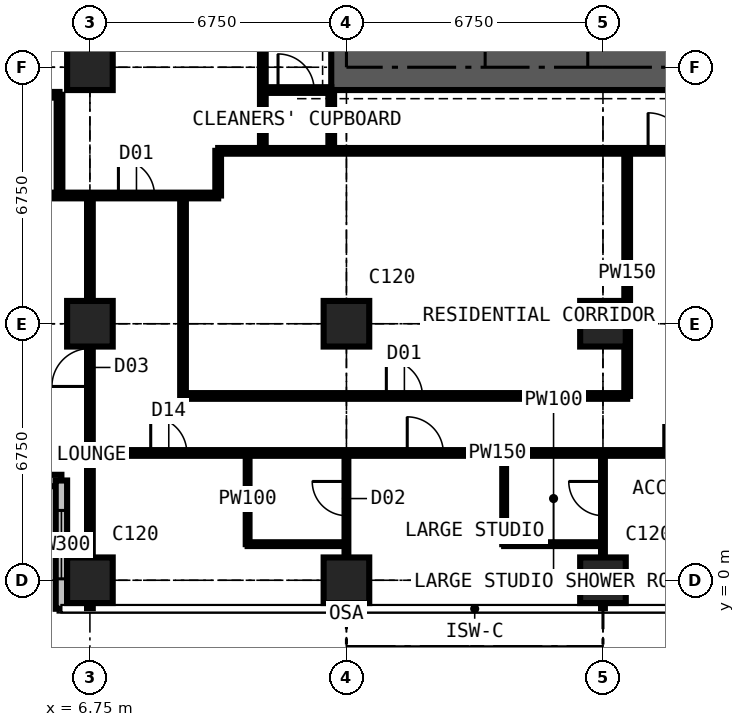
"""IFC4 building model, lengths in metres.
Left out: names, types, materials, properties, quantities, classifications, styles, units other than length and angle.
Written with IfcOpenShell. Run it as: python <this file> out.ifc"""

import sys

from ifc_helpers import new_model, si_unit, direction, frame, frame_2d, origin, origin_2d, place, context, subcontext, project, spatial, rectangle, extrude, element, fill, save


model = new_model("IFC4")
c1 = context("Model", 3, precision=1e-05, world=origin(), true_north=direction((0.0, 1.0)))
c2 = subcontext(c1, "Body", "Model", "MODEL_VIEW")
j1 = project(units=[si_unit("LENGTHUNIT", "METRE"), si_unit("PLANEANGLEUNIT", "RADIAN")], contexts=[c1])
p1 = place(None, origin())
s1 = spatial("IfcSite", under=j1, at=p1, CompositionType="ELEMENT")
p2 = place(p1, origin())
s2 = spatial("IfcBuilding", under=s1, at=p2, CompositionType="ELEMENT")
p3 = place(p2, frame((0.0, 0.0, 181.8)))
s3 = spatial("IfcBuildingStorey", under=s2, at=p3, CompositionType="ELEMENT", Elevation=181.8)
for number, where, z_axis, x_axis in (
    (1, (6.75, 0.0, 0.0), (0.0, 0.0, 1.0), (1.0, 0.0, 0.0)),
    (2, (6.75, 6.75, 0.0), (0.0, 0.0, 1.0), (1.0, 0.0, 0.0)),
    (3, (6.75, 13.5, 0.0), (0.0, 0.0, 1.0), (1.0, 0.0, 0.0)),
    (4, (13.5, 0.0, 0.0), (0.0, 0.0, 1.0), (1.0, 0.0, 0.0)),
    (5, (13.5, 6.75, 0.0), (0.0, 0.0, 1.0), (1.0, 0.0, 0.0)),
    (6, (20.25, 0.0, 0.0), (0.0, 0.0, 1.0), (1.0, 0.0, 0.0)),
    (7, (20.25, 6.75, 0.0), (0.0, 0.0, 1.0), (1.0, 0.0, 0.0)),
):
    element("IfcColumn", number, at=place(p3, frame(where, z_axis=z_axis, x_axis=x_axis)), inside=s3, PredefinedType="COLUMN", context=c2, shape_type="SweptSolid", body=[
        extrude(rectangle(XDim=1.2, YDim=1.2, at=origin_2d()), origin(), (0.0, 0.0, 1.0), 3.6),
    ])
p4 = place(p3, frame((13.1, 13.5, 0.0), z_axis=(0.0, 0.0, 1.0), x_axis=(1.0, 0.0, 0.0)))
e8 = element("IfcWall", 8, at=p4, inside=s3, PredefinedType="SHEAR", context=c2, shape_type="SweptSolid", body=[
    extrude(rectangle(XDim=14.3, YDim=1.2, at=frame_2d((7.15, 0.0))), origin(), (0.0, 0.0, 1.0), 3.6),
])
p5 = place(p3, frame((2.625, 2.625, 0.0), z_axis=(0.0, 0.0, 1.0), x_axis=(1.0, 0.0, 0.0)))
e9 = element("IfcWall", 9, at=p5, inside=s3, PredefinedType="SOLIDWALL", context=c2, shape_type="SweptSolid", body=[
    extrude(rectangle(XDim=3.375, YDim=0.3, at=frame_2d((1.688, 0.0))), origin(), (0.0, 0.0, 1.0), 3.375),
])
p6 = place(p5, frame((0.788, 0.0, 0.6)))
e10 = element("IfcOpeningElement", 10, at=p6, cuts=e9, PredefinedType="OPENING", context=c2, shape_type="SweptSolid", body=[
    extrude(rectangle(XDim=1.8, YDim=2.1, at=frame_2d((0.9, 1.05))), frame((0.0, 0.16, 0.0), z_axis=(0.0, -1.0, 0.0), x_axis=(1.0, 0.0, 0.0)), (0.0, 0.0, 1.0), 0.32),
])
p7 = place(p3, frame((6.0, 2.625, 0.0), z_axis=(0.0, 0.0, 1.0), x_axis=(0.0, -1.0, 0.0)))
e11 = element("IfcWall", 11, at=p7, inside=s3, PredefinedType="SOLIDWALL", context=c2, shape_type="SweptSolid", body=[
    extrude(rectangle(XDim=3.375, YDim=0.3, at=frame_2d((1.688, 0.0))), origin(), (0.0, 0.0, 1.0), 3.375),
])
p8 = place(p7, frame((0.788, 0.0, 0.6)))
e12 = element("IfcOpeningElement", 12, at=p8, cuts=e11, PredefinedType="OPENING", context=c2, shape_type="SweptSolid", body=[
    extrude(rectangle(XDim=1.8, YDim=2.1, at=frame_2d((0.9, 1.05))), frame((0.0, 0.16, 0.0), z_axis=(0.0, -1.0, 0.0), x_axis=(1.0, 0.0, 0.0)), (0.0, 0.0, 1.0), 0.32),
])
p9 = place(p3, frame((-0.734, 10.125, 0.0), z_axis=(0.0, 0.0, 1.0), x_axis=(1.0, 0.0, 0.0)))
e13 = element("IfcWall", 13, at=p9, inside=s3, PredefinedType="PARTITIONING", context=c2, shape_type="SweptSolid", body=[
    extrude(rectangle(XDim=10.859, YDim=0.15, at=frame_2d((5.429, 0.0))), origin(), (0.0, 0.0, 1.0), 3.375),
])
p10 = place(p9, frame((8.234, 0.0, 0.0)))
e14 = element("IfcOpeningElement", 14, at=p10, cuts=e13, PredefinedType="OPENING", context=c2, shape_type="SweptSolid", body=[
    extrude(rectangle(XDim=0.95, YDim=2.2, at=frame_2d((0.475, 1.1))), frame((0.0, 0.085, 0.0), z_axis=(0.0, -1.0, 0.0), x_axis=(1.0, 0.0, 0.0)), (0.0, 0.0, 1.0), 0.17),
])
p11 = place(p3, frame((4.85, 12.775, 0.0), z_axis=(0.0, 0.0, 1.0), x_axis=(1.0, 0.0, 0.0)))
e15 = element("IfcWall", 15, at=p11, inside=s3, PredefinedType="PARTITIONING", context=c2, shape_type="SweptSolid", body=[
    extrude(rectangle(XDim=1.1, YDim=0.15, at=frame_2d((0.55, 0.0))), origin(), (0.0, 0.0, 1.0), 3.375),
])
p12 = place(p3, frame((5.95, 10.125, 0.0), z_axis=(0.0, 0.0, 1.0), x_axis=(0.0, 1.0, 0.0)))
e16 = element("IfcWall", 16, at=p12, inside=s3, PredefinedType="PARTITIONING", context=c2, shape_type="SweptSolid", body=[
    extrude(rectangle(XDim=2.65, YDim=0.15, at=frame_2d((1.325, 0.0))), origin(), (0.0, 0.0, 1.0), 3.375),
])
p13 = place(p3, frame((6.75, -0.734, 0.0), z_axis=(0.0, 0.0, 1.0), x_axis=(0.0, 1.0, 0.0)))
e17 = element("IfcWall", 17, at=p13, inside=s3, PredefinedType="PARTITIONING", context=c2, shape_type="SweptSolid", body=[
    extrude(rectangle(XDim=10.859, YDim=0.15, at=frame_2d((5.429, 0.0))), origin(), (0.0, 0.0, 1.0), 2.877),
])
p14 = place(p13, frame((5.834, 0.0, 0.0)))
e18 = element("IfcOpeningElement", 18, at=p14, cuts=e17, PredefinedType="OPENING", context=c2, shape_type="SweptSolid", body=[
    extrude(rectangle(XDim=1.0, YDim=2.2, at=frame_2d((0.5, 1.1))), frame((0.0, 0.085, 0.0), z_axis=(0.0, -1.0, 0.0), x_axis=(1.0, 0.0, 0.0)), (0.0, 0.0, 1.0), 0.17),
])
p15 = place(p3, frame((6.75, 3.35, 0.0), z_axis=(0.0, 0.0, 1.0), x_axis=(1.0, 0.0, 0.0)))
e19 = element("IfcWall", 19, at=p15, inside=s3, PredefinedType="PARTITIONING", context=c2, shape_type="SweptSolid", body=[
    extrude(rectangle(XDim=20.25, YDim=0.15, at=frame_2d((10.125, 0.0))), origin(), (0.0, 0.0, 1.0), 3.375),
])
p16 = place(p15, frame((15.1, 0.0, 0.0)))
e20 = element("IfcOpeningElement", 20, at=p16, cuts=e19, PredefinedType="OPENING", context=c2, shape_type="SweptSolid", body=[
    extrude(rectangle(XDim=0.95, YDim=2.2, at=frame_2d((0.475, 1.1))), frame((0.0, 0.085, 0.0), z_axis=(0.0, -1.0, 0.0), x_axis=(1.0, 0.0, 0.0)), (0.0, 0.0, 1.0), 0.17),
])
p17 = place(p15, frame((8.35, 0.0, 0.0)))
e21 = element("IfcOpeningElement", 21, at=p17, cuts=e19, PredefinedType="OPENING", context=c2, shape_type="SweptSolid", body=[
    extrude(rectangle(XDim=0.95, YDim=2.2, at=frame_2d((0.475, 1.1))), frame((0.0, 0.085, 0.0), z_axis=(0.0, -1.0, 0.0), x_axis=(1.0, 0.0, 0.0)), (0.0, 0.0, 1.0), 0.17),
])
p18 = place(p15, frame((1.6, 0.0, 0.0)))
e22 = element("IfcOpeningElement", 22, at=p18, cuts=e19, PredefinedType="OPENING", context=c2, shape_type="SweptSolid", body=[
    extrude(rectangle(XDim=0.95, YDim=2.2, at=frame_2d((0.475, 1.1))), frame((0.0, 0.085, 0.0), z_axis=(0.0, -1.0, 0.0), x_axis=(1.0, 0.0, 0.0)), (0.0, 0.0, 1.0), 0.17),
])
p19 = place(p3, frame((9.2, 4.85, 0.0), z_axis=(0.0, 0.0, 1.0), x_axis=(0.0, 1.0, 0.0)))
e23 = element("IfcWall", 23, at=p19, inside=s3, PredefinedType="PARTITIONING", context=c2, shape_type="SweptSolid", body=[
    extrude(rectangle(XDim=5.275, YDim=0.15, at=frame_2d((2.637, 0.0))), origin(), (0.0, 0.0, 1.0), 3.375),
])
p20 = place(p3, frame((9.2, 4.85, 0.0), z_axis=(0.0, 0.0, 1.0), x_axis=(1.0, 0.0, 0.0)))
e24 = element("IfcWall", 24, at=p20, inside=s3, PredefinedType="PARTITIONING", context=c2, shape_type="SweptSolid", body=[
    extrude(rectangle(XDim=11.688, YDim=0.15, at=frame_2d((5.844, 0.0))), origin(), (0.0, 0.0, 1.0), 3.375),
])
p21 = place(p20, frame((5.35, 0.0, 0.0)))
e25 = element("IfcOpeningElement", 25, at=p21, cuts=e24, PredefinedType="OPENING", context=c2, shape_type="SweptSolid", body=[
    extrude(rectangle(XDim=0.95, YDim=2.2, at=frame_2d((0.475, 1.1))), frame((0.0, 0.085, 0.0), z_axis=(0.0, -1.0, 0.0), x_axis=(1.0, 0.0, 0.0)), (0.0, 0.0, 1.0), 0.17),
])
p22 = place(p3, frame((10.125, 10.125, 0.0), z_axis=(0.0, 0.0, 1.0), x_axis=(0.0, 1.0, 0.0)))
e26 = element("IfcWall", 26, at=p22, inside=s3, PredefinedType="PARTITIONING", context=c2, shape_type="SweptSolid", body=[
    extrude(rectangle(XDim=1.175, YDim=0.15, at=frame_2d((0.587, 0.0))), origin(), (0.0, 0.0, 1.0), 3.375),
])
p23 = place(p3, frame((10.125, 11.3, 0.0), z_axis=(0.0, 0.0, 1.0), x_axis=(1.0, 0.0, 0.0)))
e27 = element("IfcWall", 27, at=p23, inside=s3, PredefinedType="PARTITIONING", context=c2, shape_type="SweptSolid", body=[
    extrude(rectangle(XDim=20.475, YDim=0.15, at=frame_2d((10.238, 0.0))), origin(), (0.0, 0.0, 1.0), 3.375),
])
p24 = place(p23, frame((11.312, 0.0, 0.0)))
e28 = element("IfcOpeningElement", 28, at=p24, cuts=e27, PredefinedType="OPENING", context=c2, shape_type="SweptSolid", body=[
    extrude(rectangle(XDim=1.0, YDim=2.2, at=frame_2d((0.5, 1.1))), frame((0.0, 0.085, 0.0), z_axis=(0.0, -1.0, 0.0), x_axis=(1.0, 0.0, 0.0)), (0.0, 0.0, 1.0), 0.17),
])
p25 = place(p3, frame((10.9, 0.95, 0.0), z_axis=(0.0, 0.0, 1.0), x_axis=(0.0, 1.0, 0.0)))
e29 = element("IfcWall", 29, at=p25, inside=s3, PredefinedType="PARTITIONING", context=c2, shape_type="SweptSolid", body=[
    extrude(rectangle(XDim=2.4, YDim=0.1, at=frame_2d((1.2, 0.0))), origin(), (0.0, 0.0, 1.0), 3.375),
])
p26 = place(p3, frame((10.9, 0.95, 0.0), z_axis=(0.0, 0.0, 1.0), x_axis=(1.0, 0.0, 0.0)))
e30 = element("IfcWall", 30, at=p26, inside=s3, PredefinedType="PARTITIONING", context=c2, shape_type="SweptSolid", body=[
    extrude(rectangle(XDim=2.6, YDim=0.1, at=frame_2d((1.3, 0.0))), origin(), (0.0, 0.0, 1.0), 3.375),
])
p27 = place(p3, frame((11.3, 11.3, 0.0), z_axis=(0.0, 0.0, 1.0), x_axis=(0.0, 1.0, 0.0)))
e31 = element("IfcWall", 31, at=p27, inside=s3, PredefinedType="PARTITIONING", context=c2, shape_type="SweptSolid", body=[
    extrude(rectangle(XDim=19.3, YDim=0.15, at=frame_2d((9.65, 0.0))), origin(), (0.0, 0.0, 1.0), 3.375),
])
p28 = place(p27, frame((13.525, 0.0, 0.0)))
e32 = element("IfcOpeningElement", 32, at=p28, cuts=e31, PredefinedType="OPENING", context=c2, shape_type="SweptSolid", body=[
    extrude(rectangle(XDim=1.0, YDim=2.2, at=frame_2d((0.5, 1.1))), frame((0.0, 0.085, 0.0), z_axis=(0.0, -1.0, 0.0), x_axis=(1.0, 0.0, 0.0)), (0.0, 0.0, 1.0), 0.17),
])
p29 = place(p27, frame((10.438, 0.0, 0.0)))
e33 = element("IfcOpeningElement", 33, at=p29, cuts=e31, PredefinedType="OPENING", context=c2, shape_type="SweptSolid", body=[
    extrude(rectangle(XDim=1.0, YDim=2.2, at=frame_2d((0.5, 1.1))), frame((0.0, 0.085, 0.0), z_axis=(0.0, -1.0, 0.0), x_axis=(1.0, 0.0, 0.0)), (0.0, 0.0, 1.0), 0.17),
])
p30 = place(p3, frame((11.3, 12.9, 0.0), z_axis=(0.0, 0.0, 1.0), x_axis=(1.0, 0.0, 0.0)))
e34 = element("IfcWall", 34, at=p30, inside=s3, PredefinedType="PARTITIONING", context=c2, shape_type="SweptSolid", body=[
    extrude(rectangle(XDim=1.8, YDim=0.15, at=frame_2d((0.9, 0.0))), origin(), (0.0, 0.0, 1.0), 2.806),
])
p31 = place(p30, frame((0.4, 0.0, 0.0)))
e35 = element("IfcOpeningElement", 35, at=p31, cuts=e34, PredefinedType="OPENING", context=c2, shape_type="SweptSolid", body=[
    extrude(rectangle(XDim=0.95, YDim=2.2, at=frame_2d((0.475, 1.1))), frame((0.0, 0.085, 0.0), z_axis=(0.0, -1.0, 0.0), x_axis=(1.0, 0.0, 0.0)), (0.0, 0.0, 1.0), 0.17),
])
p32 = place(p3, frame((13.1, 11.3, 0.0), z_axis=(0.0, 0.0, 1.0), x_axis=(0.0, 1.0, 0.0)))
e36 = element("IfcWall", 36, at=p32, inside=s3, PredefinedType="PARTITIONING", context=c2, shape_type="SweptSolid", body=[
    extrude(rectangle(XDim=1.6, YDim=0.15, at=frame_2d((0.8, 0.0))), origin(), (0.0, 0.0, 1.0), 3.375),
])
p33 = place(p3, frame((13.5, -0.734, 0.0), z_axis=(0.0, 0.0, 1.0), x_axis=(0.0, 1.0, 0.0)))
e37 = element("IfcWall", 37, at=p33, inside=s3, PredefinedType="PARTITIONING", context=c2, shape_type="SweptSolid", body=[
    extrude(rectangle(XDim=4.084, YDim=0.1, at=frame_2d((2.042, 0.0))), origin(), (0.0, 0.0, 1.0), 2.61),
])
p34 = place(p33, frame((2.434, 0.0, 0.0)))
e38 = element("IfcOpeningElement", 38, at=p34, cuts=e37, PredefinedType="OPENING", context=c2, shape_type="SweptSolid", body=[
    extrude(rectangle(XDim=0.9, YDim=2.2, at=frame_2d((0.45, 1.1))), frame((0.0, 0.06, 0.0), z_axis=(0.0, -1.0, 0.0), x_axis=(1.0, 0.0, 0.0)), (0.0, 0.0, 1.0), 0.12),
])
p35 = place(p3, frame((17.65, 0.95, 0.0), z_axis=(0.0, 0.0, 1.0), x_axis=(0.0, 1.0, 0.0)))
e39 = element("IfcWall", 39, at=p35, inside=s3, PredefinedType="PARTITIONING", context=c2, shape_type="SweptSolid", body=[
    extrude(rectangle(XDim=2.4, YDim=0.1, at=frame_2d((1.2, 0.0))), origin(), (0.0, 0.0, 1.0), 3.375),
])
p36 = place(p3, frame((17.65, 0.95, 0.0), z_axis=(0.0, 0.0, 1.0), x_axis=(1.0, 0.0, 0.0)))
e40 = element("IfcWall", 40, at=p36, inside=s3, PredefinedType="PARTITIONING", context=c2, shape_type="SweptSolid", body=[
    extrude(rectangle(XDim=2.6, YDim=0.1, at=frame_2d((1.3, 0.0))), origin(), (0.0, 0.0, 1.0), 3.375),
])
p37 = place(p3, frame((20.25, -0.734, 0.0), z_axis=(0.0, 0.0, 1.0), x_axis=(0.0, 1.0, 0.0)))
e41 = element("IfcWall", 41, at=p37, inside=s3, PredefinedType="PARTITIONING", context=c2, shape_type="SweptSolid", body=[
    extrude(rectangle(XDim=4.084, YDim=0.1, at=frame_2d((2.042, 0.0))), origin(), (0.0, 0.0, 1.0), 2.61),
])
p38 = place(p37, frame((2.434, 0.0, 0.0)))
e42 = element("IfcOpeningElement", 42, at=p38, cuts=e41, PredefinedType="OPENING", context=c2, shape_type="SweptSolid", body=[
    extrude(rectangle(XDim=0.9, YDim=2.2, at=frame_2d((0.45, 1.1))), frame((0.0, 0.06, 0.0), z_axis=(0.0, -1.0, 0.0), x_axis=(1.0, 0.0, 0.0)), (0.0, 0.0, 1.0), 0.12),
])
p39 = place(p3, frame((20.887, 4.85, 0.0), z_axis=(0.0, 0.0, 1.0), x_axis=(0.0, 1.0, 0.0)))
e43 = element("IfcWall", 43, at=p39, inside=s3, PredefinedType="PARTITIONING", context=c2, shape_type="SweptSolid", body=[
    extrude(rectangle(XDim=6.45, YDim=0.15, at=frame_2d((3.225, 0.0))), origin(), (0.0, 0.0, 1.0), 3.375),
])
p40 = place(p8, origin())
e44 = element("IfcWindow", 44, at=p40, inside=s3, PartitioningType="SINGLE_PANEL", PredefinedType="WINDOW", context=c2, shape_type="SweptSolid", body=[
    extrude(rectangle(XDim=1.8, YDim=2.1, at=frame_2d((0.9, 1.05))), frame((0.0, 0.03, 0.0), z_axis=(0.0, -1.0, 0.0), x_axis=(1.0, 0.0, 0.0)), (0.0, 0.0, 1.0), 0.06),
])
fill(e12, e44)
p41 = place(p31, origin())
e45 = element("IfcDoor", 45, at=p41, inside=s3, OperationType="SINGLE_SWING_LEFT", PredefinedType="DOOR", context=c2, shape_type="SweptSolid", body=[
    extrude(rectangle(XDim=0.95, YDim=2.2, at=frame_2d((0.475, 1.1))), frame((0.0, 0.025, 0.0), z_axis=(0.0, -1.0, 0.0), x_axis=(1.0, 0.0, 0.0)), (0.0, 0.0, 1.0), 0.05),
])
fill(e35, e45)
p42 = place(p14, origin())
e46 = element("IfcDoor", 46, at=p42, inside=s3, OperationType="SINGLE_SWING_LEFT", PredefinedType="DOOR", context=c2, shape_type="SweptSolid", body=[
    extrude(rectangle(XDim=1.0, YDim=2.2, at=frame_2d((0.5, 1.1))), frame((0.0, 0.025, 0.0), z_axis=(0.0, -1.0, 0.0), x_axis=(1.0, 0.0, 0.0)), (0.0, 0.0, 1.0), 0.05),
])
fill(e18, e46)
p43 = place(p16, origin())
e47 = element("IfcDoor", 47, at=p43, inside=s3, OperationType="SINGLE_SWING_LEFT", PredefinedType="DOOR", context=c2, shape_type="SweptSolid", body=[
    extrude(rectangle(XDim=0.95, YDim=2.2, at=frame_2d((0.475, 1.1))), frame((0.0, 0.025, 0.0), z_axis=(0.0, -1.0, 0.0), x_axis=(1.0, 0.0, 0.0)), (0.0, 0.0, 1.0), 0.05),
])
fill(e20, e47)
p44 = place(p17, origin())
e48 = element("IfcDoor", 48, at=p44, inside=s3, OperationType="SINGLE_SWING_LEFT", PredefinedType="DOOR", context=c2, shape_type="SweptSolid", body=[
    extrude(rectangle(XDim=0.95, YDim=2.2, at=frame_2d((0.475, 1.1))), frame((0.0, 0.025, 0.0), z_axis=(0.0, -1.0, 0.0), x_axis=(1.0, 0.0, 0.0)), (0.0, 0.0, 1.0), 0.05),
])
fill(e21, e48)
p45 = place(p38, origin())
e49 = element("IfcDoor", 49, at=p45, inside=s3, OperationType="SINGLE_SWING_RIGHT", PredefinedType="DOOR", context=c2, shape_type="SweptSolid", body=[
    extrude(rectangle(XDim=0.9, YDim=2.2, at=frame_2d((0.45, 1.1))), frame((0.0, 0.025, 0.0), z_axis=(0.0, -1.0, 0.0), x_axis=(1.0, 0.0, 0.0)), (0.0, 0.0, 1.0), 0.05),
])
fill(e42, e49)
p46 = place(p18, origin())
e50 = element("IfcDoor", 50, at=p46, inside=s3, OperationType="SINGLE_SWING_LEFT", PredefinedType="DOOR", context=c2, shape_type="SweptSolid", body=[
    extrude(rectangle(XDim=0.95, YDim=2.2, at=frame_2d((0.475, 1.1))), frame((0.0, 0.025, 0.0), z_axis=(0.0, -1.0, 0.0), x_axis=(1.0, 0.0, 0.0)), (0.0, 0.0, 1.0), 0.05),
])
fill(e22, e50)
p47 = place(p34, origin())
e51 = element("IfcDoor", 51, at=p47, inside=s3, OperationType="SINGLE_SWING_RIGHT", PredefinedType="DOOR", context=c2, shape_type="SweptSolid", body=[
    extrude(rectangle(XDim=0.9, YDim=2.2, at=frame_2d((0.45, 1.1))), frame((0.0, 0.025, 0.0), z_axis=(0.0, -1.0, 0.0), x_axis=(1.0, 0.0, 0.0)), (0.0, 0.0, 1.0), 0.05),
])
fill(e38, e51)
p48 = place(p24, origin())
e52 = element("IfcDoor", 52, at=p48, inside=s3, OperationType="SINGLE_SWING_LEFT", PredefinedType="DOOR", context=c2, shape_type="SweptSolid", body=[
    extrude(rectangle(XDim=1.0, YDim=2.2, at=frame_2d((0.5, 1.1))), frame((0.0, 0.025, 0.0), z_axis=(0.0, -1.0, 0.0), x_axis=(1.0, 0.0, 0.0)), (0.0, 0.0, 1.0), 0.05),
])
fill(e28, e52)
p49 = place(p21, origin())
e53 = element("IfcDoor", 53, at=p49, inside=s3, OperationType="SINGLE_SWING_LEFT", PredefinedType="DOOR", context=c2, shape_type="SweptSolid", body=[
    extrude(rectangle(XDim=0.95, YDim=2.2, at=frame_2d((0.475, 1.1))), frame((0.0, 0.025, 0.0), z_axis=(0.0, -1.0, 0.0), x_axis=(1.0, 0.0, 0.0)), (0.0, 0.0, 1.0), 0.05),
])
fill(e25, e53)
p50 = place(p10, origin())
e54 = element("IfcDoor", 54, at=p50, inside=s3, OperationType="SINGLE_SWING_LEFT", PredefinedType="DOOR", context=c2, shape_type="SweptSolid", body=[
    extrude(rectangle(XDim=0.95, YDim=2.2, at=frame_2d((0.475, 1.1))), frame((0.0, 0.025, 0.0), z_axis=(0.0, -1.0, 0.0), x_axis=(1.0, 0.0, 0.0)), (0.0, 0.0, 1.0), 0.05),
])
fill(e14, e54)
save(model, sys.argv[1])
